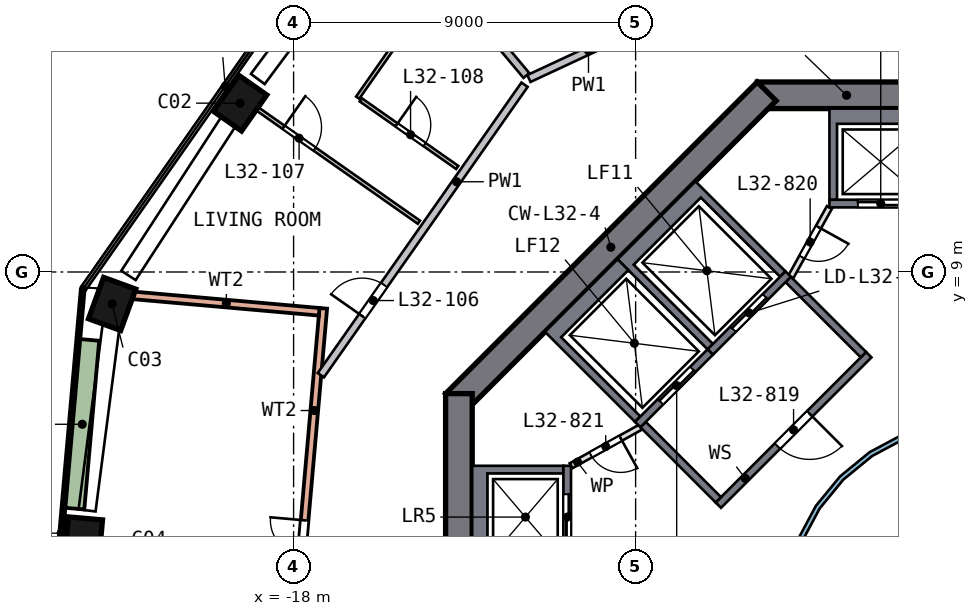
"""IFC4 building model, lengths in metres.
Left out: names, types, materials, properties, quantities, classifications, styles, units other than length and angle.
Written with IfcOpenShell. Run it as: python <this file> out.ifc"""

import sys

from ifc_helpers import new_model, si_unit, direction, frame, frame_2d, origin, origin_2d, place, context, subcontext, project, spatial, polyline, rectangle, outline, extrude, element, fill, save


model = new_model("IFC4")
c1 = context("Model", 3, precision=1e-05, world=origin(), true_north=direction((0.0, 1.0)))
c2 = subcontext(c1, "Body", "Model", "MODEL_VIEW")
j1 = project(units=[si_unit("LENGTHUNIT", "METRE"), si_unit("PLANEANGLEUNIT", "RADIAN")], contexts=[c1])
p1 = place(None, origin())
s1 = spatial("IfcSite", under=j1, at=p1, CompositionType="ELEMENT")
p2 = place(p1, origin())
s2 = spatial("IfcBuilding", under=s1, at=p2, CompositionType="ELEMENT")
p3 = place(p2, frame((0.0, 0.0, 136.5)))
s3 = spatial("IfcBuildingStorey", under=s2, at=p3, CompositionType="ELEMENT", Elevation=136.5)
p4 = place(p3, frame((-19.329, 13.555, 0.0), z_axis=(-0.063730151, -0.092477164, 0.993673207), x_axis=(-0.57078057, -0.813386058, -0.112306105)))
e1 = element("IfcColumn", 1, at=p4, inside=s3, PredefinedType="COLUMN", context=c2, shape_type="SweptSolid", body=[
    extrude(rectangle(XDim=1.15, YDim=0.9, at=origin_2d()), origin(), (0.0, 0.0, 1.0), 3.21),
])
p5 = place(p3, frame((-22.728, 8.29, 0.0), z_axis=(-0.038545284, -0.108413363, 0.993358346), x_axis=(0.340705914, 0.933103009, 0.115057614)))
e2 = element("IfcColumn", 2, at=p5, inside=s3, PredefinedType="COLUMN", context=c2, shape_type="SweptSolid", body=[
    extrude(rectangle(XDim=1.15, YDim=0.9, at=origin_2d()), origin(), (0.0, 0.0, 1.0), 3.211),
])
p6 = place(p3, frame((-23.517, 2.074, 0.0), z_axis=(-0.008897896, -0.111946178, 0.993674434), x_axis=(-0.087134884, -0.989847104, -0.112295249)))
e3 = element("IfcColumn", 3, at=p6, inside=s3, PredefinedType="COLUMN", context=c2, shape_type="SweptSolid", body=[
    extrude(rectangle(XDim=1.15, YDim=0.9, at=origin_2d()), origin(), (0.0, 0.0, 1.0), 3.21),
])
p7 = place(p3, frame((5.799, 13.65, 0.0), z_axis=(0.0, 0.0, 1.0), x_axis=(-1.0, 0.0, 0.0)))
e4 = element("IfcWall", 4, at=p7, inside=s3, PredefinedType="SHEAR", context=c2, shape_type="SweptSolid", body=[
    extrude(rectangle(XDim=11.598, YDim=0.7, at=frame_2d((5.799, 0.0))), origin(), (0.0, 0.0, 1.0), 3.5),
])
p8 = place(p7, frame((4.899, 0.0, 0.0)))
e5 = element("IfcOpeningElement", 5, at=p8, cuts=e4, PredefinedType="OPENING", context=c2, shape_type="SweptSolid", body=[
    extrude(rectangle(XDim=1.8, YDim=2.1, at=frame_2d((0.9, 1.05))), frame((0.0, 0.36, 0.0), z_axis=(0.0, -1.0, 0.0), x_axis=(1.0, 0.0, 0.0)), (0.0, 0.0, 1.0), 0.72),
])
p9 = place(p3, frame((-5.552, 13.752, 0.0), z_axis=(0.0, 0.0, 1.0), x_axis=(-0.707106781, -0.707106781, 0.0)))
e6 = element("IfcWall", 6, at=p9, inside=s3, PredefinedType="SHEAR", context=c2, shape_type="SweptSolid", body=[
    extrude(rectangle(XDim=11.598, YDim=0.7, at=frame_2d((5.799, 0.0))), origin(), (0.0, 0.0, 1.0), 3.5),
])
p10 = place(p3, frame((-13.65, 5.799, 0.0), z_axis=(0.0, 0.0, 1.0), x_axis=(0.0, -1.0, 0.0)))
e7 = element("IfcWall", 7, at=p10, inside=s3, PredefinedType="SHEAR", context=c2, shape_type="SweptSolid", body=[
    extrude(rectangle(XDim=11.598, YDim=0.7, at=frame_2d((5.799, 0.0))), origin(), (0.0, 0.0, 1.0), 3.5),
])
p11 = place(p10, frame((4.899, 0.0, 0.0)))
e8 = element("IfcOpeningElement", 8, at=p11, cuts=e7, PredefinedType="OPENING", context=c2, shape_type="SweptSolid", body=[
    extrude(rectangle(XDim=1.8, YDim=2.1, at=frame_2d((0.9, 1.05))), frame((0.0, 0.36, 0.0), z_axis=(0.0, -1.0, 0.0), x_axis=(1.0, 0.0, 0.0)), (0.0, 0.0, 1.0), 0.72),
])
p12 = place(p3, frame((-18.36, -4.906, 0.0), z_axis=(0.0, 0.0, 1.0), x_axis=(0.087853252, 0.996133428, 0.0)))
e9 = element("IfcWall", 9, at=p12, inside=s3, PredefinedType="SOLIDWALL", context=c2, shape_type="SweptSolid", body=[
    extrude(rectangle(XDim=13.0, YDim=0.2, at=frame_2d((6.5, 0.0))), origin(), (0.0, 0.0, 1.0), 3.19),
])
p13 = place(p12, frame((5.6, 0.0, 0.0)))
e10 = element("IfcOpeningElement", 10, at=p13, cuts=e9, PredefinedType="OPENING", context=c2, shape_type="SweptSolid", body=[
    extrude(rectangle(XDim=1.8, YDim=2.4, at=frame_2d((0.9, 1.2))), frame((0.0, 0.11, 0.0), z_axis=(0.0, -1.0, 0.0), x_axis=(1.0, 0.0, 0.0)), (0.0, 0.0, 1.0), 0.22),
])
p14 = place(p3, frame((-22.212, 8.384, 0.0), z_axis=(0.0, 0.0, 1.0), x_axis=(0.996132413, -0.087864753, 0.0)))
e11 = element("IfcWall", 11, at=p14, inside=s3, PredefinedType="SOLIDWALL", context=c2, shape_type="SweptSolid", body=[
    extrude(rectangle(XDim=4.904, YDim=0.2, at=frame_2d((2.452, 0.0))), origin(), (0.0, 0.0, 1.0), 3.19),
])
p15 = place(p3, frame((-23.551, 8.522, 0.0), z_axis=(0.0, 0.0, 1.0), x_axis=(-0.087843868, -0.996134255, 0.0)))
e12 = element("IfcWall", 12, at=p15, inside=s3, PredefinedType="SOLIDWALL", context=c2, shape_type="SweptSolid", body=[
    extrude(rectangle(XDim=12.84, YDim=0.1, at=frame_2d((6.42, 0.0))), origin(), (0.0, 0.0, 1.0), 0.7),
])
p16 = place(p3, frame((-23.365, 7.213, 0.0), z_axis=(0.0, 0.0, 1.0), x_axis=(-0.087858642, -0.996132953, 0.0)))
e13 = element("IfcWall", 13, at=p16, inside=s3, PredefinedType="SOLIDWALL", context=c2, shape_type="SweptSolid", body=[
    extrude(rectangle(XDim=4.457, YDim=0.5, at=frame_2d((2.229, 0.0))), origin(), (0.0, 0.0, 1.0), 0.7),
])
p17 = place(p3, origin())
e14 = element("IfcWall", 14, at=p17, inside=s3, PredefinedType="SOLIDWALL", context=c2, shape_type="SweptSolid", body=[
    extrude(outline(polyline([(-3.9, 10.9), (-3.9, 13.3), (-1.2, 13.3), (-1.2, 10.9), (-1.4, 10.9), (-1.4, 12.9), (-3.7, 12.9), (-3.7, 10.9), (-3.9, 10.9)])), origin(), (0.0, 0.0, 1.0), 3.19),
])
p18 = place(p3, frame((-1.2, 10.8, 0.0), z_axis=(0.0, 0.0, 1.0), x_axis=(-1.0, 0.0, 0.0)))
e15 = element("IfcWall", 15, at=p18, inside=s3, PredefinedType="SOLIDWALL", context=c2, shape_type="SweptSolid", body=[
    extrude(rectangle(XDim=2.7, YDim=0.2, at=frame_2d((1.35, 0.0))), origin(), (0.0, 0.0, 1.0), 3.19),
])
p19 = place(p18, frame((0.75, 0.0, 0.0)))
e16 = element("IfcOpeningElement", 16, at=p19, cuts=e15, PredefinedType="OPENING", context=c2, shape_type="SweptSolid", body=[
    extrude(rectangle(XDim=1.2, YDim=2.1, at=frame_2d((0.6, 1.05))), frame((0.0, 0.11, 0.0), z_axis=(0.0, -1.0, 0.0), x_axis=(1.0, 0.0, 0.0)), (0.0, 0.0, 1.0), 0.22),
])
p20 = place(p3, origin())
e17 = element("IfcWall", 17, at=p20, inside=s3, PredefinedType="SOLIDWALL", context=c2, shape_type="SweptSolid", body=[
    extrude(outline(polyline([(-13.3, 3.9), (-10.9, 3.9), (-10.9, 3.7), (-12.9, 3.7), (-12.9, 1.4), (-10.9, 1.4), (-10.9, 1.2), (-13.3, 1.2), (-13.3, 3.9)])), origin(), (0.0, 0.0, 1.0), 3.19),
])
p21 = place(p3, frame((-10.8, 1.2, 0.0), z_axis=(0.0, 0.0, 1.0), x_axis=(0.0, 1.0, 0.0)))
e18 = element("IfcWall", 18, at=p21, inside=s3, PredefinedType="SOLIDWALL", context=c2, shape_type="SweptSolid", body=[
    extrude(rectangle(XDim=2.7, YDim=0.2, at=frame_2d((1.35, 0.0))), origin(), (0.0, 0.0, 1.0), 3.19),
])
p22 = place(p21, frame((0.75, 0.0, 0.0)))
e19 = element("IfcOpeningElement", 19, at=p22, cuts=e18, PredefinedType="OPENING", context=c2, shape_type="SweptSolid", body=[
    extrude(rectangle(XDim=1.2, YDim=2.1, at=frame_2d((0.6, 1.05))), frame((0.0, 0.11, 0.0), z_axis=(0.0, -1.0, 0.0), x_axis=(1.0, 0.0, 0.0)), (0.0, 0.0, 1.0), 0.22),
])
p23 = place(p3, origin())
e20 = element("IfcWall", 20, at=p23, inside=s3, PredefinedType="SOLIDWALL", context=c2, shape_type="SweptSolid", body=[
    extrude(outline(polyline([(-9.475, 9.334), (-7.425, 11.385), (-5.056, 9.016), (-5.197, 8.874), (-7.283, 10.96), (-9.051, 9.192), (-6.965, 7.106), (-7.106, 6.965), (-9.475, 9.334)])), origin(), (0.0, 0.0, 1.0), 3.19),
])
p24 = place(p3, frame((-4.985, 8.945, 0.0), z_axis=(0.0, 0.0, 1.0), x_axis=(-0.707106781, -0.707106781, 0.0)))
e21 = element("IfcWall", 21, at=p24, inside=s3, PredefinedType="SOLIDWALL", context=c2, shape_type="SweptSolid", body=[
    extrude(rectangle(XDim=2.9, YDim=0.2, at=frame_2d((1.45, 0.0))), origin(), (0.0, 0.0, 1.0), 3.19),
])
p25 = place(p24, frame((0.85, 0.0, 0.0)))
e22 = element("IfcOpeningElement", 22, at=p25, cuts=e21, PredefinedType="OPENING", context=c2, shape_type="SweptSolid", body=[
    extrude(rectangle(XDim=1.2, YDim=2.1, at=frame_2d((0.6, 1.05))), frame((0.0, 0.11, 0.0), z_axis=(0.0, -1.0, 0.0), x_axis=(1.0, 0.0, 0.0)), (0.0, 0.0, 1.0), 0.22),
])
p26 = place(p3, origin())
e23 = element("IfcWall", 23, at=p26, inside=s3, PredefinedType="SOLIDWALL", context=c2, shape_type="SweptSolid", body=[
    extrude(outline(polyline([(-11.385, 7.425), (-9.475, 9.334), (-9.192, 9.051), (-10.96, 7.283), (-8.874, 5.197), (-9.016, 5.056), (-11.385, 7.425)])), origin(), (0.0, 0.0, 1.0), 3.19),
])
p27 = place(p3, frame((-7.036, 6.894, 0.0), z_axis=(0.0, 0.0, 1.0), x_axis=(-0.707106781, -0.707106781, 0.0)))
e24 = element("IfcWall", 24, at=p27, inside=s3, PredefinedType="SOLIDWALL", context=c2, shape_type="SweptSolid", body=[
    extrude(rectangle(XDim=2.7, YDim=0.2, at=frame_2d((1.35, 0.0))), origin(), (0.0, 0.0, 1.0), 3.19),
])
p28 = place(p27, frame((0.65, 0.0, 0.0)))
e25 = element("IfcOpeningElement", 25, at=p28, cuts=e24, PredefinedType="OPENING", context=c2, shape_type="SweptSolid", body=[
    extrude(rectangle(XDim=1.2, YDim=2.1, at=frame_2d((0.6, 1.05))), frame((0.0, 0.11, 0.0), z_axis=(0.0, -1.0, 0.0), x_axis=(1.0, 0.0, 0.0)), (0.0, 0.0, 1.0), 0.22),
])
p29 = place(p3, frame((-2.864, 6.823, 0.0), z_axis=(0.0, 0.0, 1.0), x_axis=(-0.707106781, -0.707106781, 0.0)))
e26 = element("IfcWall", 26, at=p29, inside=s3, PredefinedType="SOLIDWALL", context=c2, shape_type="SweptSolid", body=[
    extrude(rectangle(XDim=5.6, YDim=0.2, at=frame_2d((2.8, 0.0))), origin(), (0.0, 0.0, 1.0), 3.19),
])
p30 = place(p29, frame((2.2, 0.0, 0.0)))
e27 = element("IfcOpeningElement", 27, at=p30, cuts=e26, PredefinedType="OPENING", context=c2, shape_type="SweptSolid", body=[
    extrude(rectangle(XDim=1.2, YDim=2.1, at=frame_2d((0.6, 1.05))), frame((0.0, 0.11, 0.0), z_axis=(0.0, -1.0, 0.0), x_axis=(1.0, 0.0, 0.0)), (0.0, 0.0, 1.0), 0.22),
])
for number, where, z_axis, x_axis in (
    (28, (-3.005, 6.823, 0.0), (0.0, 0.0, 1.0), (-0.707, 0.707, 0.0)),
    (29, (-6.823, 3.005, 0.0), (0.0, 0.0, 1.0), (-0.707, 0.707, 0.0)),
):
    element("IfcWall", number, at=place(p3, frame(where, z_axis=z_axis, x_axis=x_axis)), inside=s3, PredefinedType="SOLIDWALL", context=c2, shape_type="SweptSolid", body=[
        extrude(rectangle(XDim=2.8, YDim=0.2, at=frame_2d((1.4, 0.0))), origin(), (0.0, 0.0, 1.0), 3.19),
    ])
p31 = place(p3, frame((-3.9, 10.7, 0.0), z_axis=(0.0, 0.0, 1.0), x_axis=(-0.485692555, -0.874129705, 0.0)))
e30 = element("IfcWall", 30, at=p31, inside=s3, PredefinedType="PARTITIONING", context=c2, shape_type="SweptSolid", body=[
    extrude(rectangle(XDim=2.089, YDim=0.15, at=frame_2d((1.044, 0.0))), origin(), (0.0, 0.0, 1.0), 3.19),
])
p32 = place(p31, frame((0.594, 0.0, 0.0)))
e31 = element("IfcOpeningElement", 31, at=p32, cuts=e30, PredefinedType="OPENING", context=c2, shape_type="SweptSolid", body=[
    extrude(rectangle(XDim=0.9, YDim=2.1, at=frame_2d((0.45, 1.05))), frame((0.0, 0.085, 0.0), z_axis=(0.0, -1.0, 0.0), x_axis=(1.0, 0.0, 0.0)), (0.0, 0.0, 1.0), 0.17),
])
p33 = place(p3, frame((-8.874, 4.914, 0.0), z_axis=(0.0, 0.0, 1.0), x_axis=(-0.874129705, -0.485692555, 0.0)))
e32 = element("IfcWall", 32, at=p33, inside=s3, PredefinedType="PARTITIONING", context=c2, shape_type="SweptSolid", body=[
    extrude(rectangle(XDim=2.089, YDim=0.15, at=frame_2d((1.044, 0.0))), origin(), (0.0, 0.0, 1.0), 3.19),
])
p34 = place(p33, frame((0.594, 0.0, 0.0)))
e33 = element("IfcOpeningElement", 33, at=p34, cuts=e32, PredefinedType="OPENING", context=c2, shape_type="SweptSolid", body=[
    extrude(rectangle(XDim=0.9, YDim=2.1, at=frame_2d((0.45, 1.05))), frame((0.0, 0.085, 0.0), z_axis=(0.0, -1.0, 0.0), x_axis=(1.0, 0.0, 0.0)), (0.0, 0.0, 1.0), 0.17),
])
p35 = place(p3, origin())
e34 = element("IfcWall", 34, at=p35, inside=s3, PredefinedType="SOLIDWALL", context=c2, shape_type="SweptSolid", body=[
    extrude(outline(polyline([(5.021, -0.999), (4.73, -1.959), (4.257, -2.844), (3.62, -3.62), (2.844, -4.257), (1.959, -4.73), (0.999, -5.021), (0.0, -5.12), (-0.999, -5.021), (-1.959, -4.73), (-2.844, -4.257), (-3.62, -3.62), (-4.257, -2.844), (-4.73, -1.959), (-5.021, -0.999), (-5.12, 0.0), (-5.021, 0.999), (-4.73, 1.959), (-4.257, 2.844), (-3.62, 3.62), (-2.844, 4.257), (-1.959, 4.73), (-0.999, 5.021), (0.0, 5.12), (0.999, 5.021), (1.959, 4.73), (2.844, 4.257), (3.62, 3.62), (4.257, 2.844), (4.73, 1.959), (5.021, 0.999), (5.12, 0.0), (5.021, -0.999)]), holes=[polyline([(4.904, 0.976), (4.619, 1.913), (4.157, 2.778), (3.535, 3.535), (2.778, 4.157), (1.913, 4.619), (0.976, 4.904), (0.0, 5.0), (-0.976, 4.904), (-1.913, 4.619), (-2.778, 4.157), (-3.535, 3.535), (-4.157, 2.778), (-4.619, 1.913), (-4.904, 0.976), (-5.0, 0.0), (-4.904, -0.976), (-4.619, -1.913), (-4.157, -2.778), (-3.535, -3.535), (-2.778, -4.157), (-1.913, -4.619), (-0.976, -4.904), (0.0, -5.0), (0.976, -4.904), (1.913, -4.619), (2.778, -4.157), (3.535, -3.535), (4.157, -2.778), (4.619, -1.913), (4.904, -0.976), (5.0, 0.0), (4.904, 0.976)])]), origin(), (0.0, 0.0, 1.0), 3.19),
])
p36 = place(p3, frame((-17.283, 6.284, 0.0), z_axis=(0.0, 0.0, 1.0), x_axis=(0.574151841, 0.81874884, 0.0)))
e35 = element("IfcWall", 35, at=p36, inside=s3, PredefinedType="SOLIDWALL", context=c2, shape_type="SweptSolid", body=[
    extrude(rectangle(XDim=9.336, YDim=0.2, at=frame_2d((4.668, 0.0))), origin(), (0.0, 0.0, 1.0), 3.19),
])
p37 = place(p36, frame((1.9, 0.0, 0.0)))
e36 = element("IfcOpeningElement", 36, at=p37, cuts=e35, PredefinedType="OPENING", context=c2, shape_type="SweptSolid", body=[
    extrude(rectangle(XDim=1.0, YDim=2.1, at=frame_2d((0.5, 1.05))), frame((0.0, 0.11, 0.0), z_axis=(0.0, -1.0, 0.0), x_axis=(1.0, 0.0, 0.0)), (0.0, 0.0, 1.0), 0.22),
])
p38 = place(p3, frame((-8.672, 15.551, 0.0), z_axis=(0.0, 0.0, 1.0), x_axis=(-0.906586718, -0.422019576, 0.0)))
e37 = element("IfcWall", 37, at=p38, inside=s3, PredefinedType="SOLIDWALL", context=c2, shape_type="SweptSolid", body=[
    extrude(rectangle(XDim=3.458, YDim=0.2, at=frame_2d((1.729, 0.0))), origin(), (0.0, 0.0, 1.0), 3.19),
])
p39 = place(p3, frame((-11.874, 14.171, 0.0), z_axis=(0.0, 0.0, 1.0), x_axis=(-0.642233473, 0.766509078, 0.0)))
e38 = element("IfcWall", 38, at=p39, inside=s3, PredefinedType="SOLIDWALL", context=c2, shape_type="SweptSolid", body=[
    extrude(rectangle(XDim=3.418, YDim=0.2, at=frame_2d((1.709, 0.0))), origin(), (0.0, 0.0, 1.0), 3.19),
])
p40 = place(p3, frame((-19.739, 13.842, 0.0), z_axis=(0.0, 0.0, 1.0), x_axis=(0.818756071, -0.57414153, 0.0)))
e39 = element("IfcWall", 39, at=p40, inside=s3, PredefinedType="PARTITIONING", context=c2, shape_type="SweptSolid", body=[
    extrude(rectangle(XDim=6.15, YDim=0.1, at=frame_2d((3.075, 0.0))), origin(), (0.0, 0.0, 1.0), 3.19),
])
p41 = place(p40, frame((1.8, 0.0, 0.0)))
e40 = element("IfcOpeningElement", 40, at=p41, cuts=e39, PredefinedType="OPENING", context=c2, shape_type="SweptSolid", body=[
    extrude(rectangle(XDim=1.0, YDim=2.1, at=frame_2d((0.5, 1.05))), frame((0.0, 0.06, 0.0), z_axis=(0.0, -1.0, 0.0), x_axis=(1.0, 0.0, 0.0)), (0.0, 0.0, 1.0), 0.12),
])
p42 = place(p3, frame((-14.187, 16.62, 0.0), z_axis=(0.0, 0.0, 1.0), x_axis=(-0.574152218, -0.818748576, 0.0)))
e41 = element("IfcWall", 41, at=p42, inside=s3, PredefinedType="PARTITIONING", context=c2, shape_type="SweptSolid", body=[
    extrude(rectangle(XDim=3.704, YDim=0.1, at=frame_2d((1.852, 0.0))), origin(), (0.0, 0.0, 1.0), 3.19),
])
p43 = place(p3, frame((-16.232, 13.53, 0.0), z_axis=(0.0, 0.0, 1.0), x_axis=(0.818758042, -0.574138719, 0.0)))
e42 = element("IfcWall", 42, at=p43, inside=s3, PredefinedType="PARTITIONING", context=c2, shape_type="SweptSolid", body=[
    extrude(rectangle(XDim=3.1, YDim=0.1, at=frame_2d((1.55, 0.0))), origin(), (0.0, 0.0, 1.0), 3.19),
])
p44 = place(p43, frame((1.15, 0.0, 0.0)))
e43 = element("IfcOpeningElement", 43, at=p44, cuts=e42, PredefinedType="OPENING", context=c2, shape_type="SweptSolid", body=[
    extrude(rectangle(XDim=0.9, YDim=2.1, at=frame_2d((0.45, 1.05))), frame((0.0, 0.06, 0.0), z_axis=(0.0, -1.0, 0.0), x_axis=(1.0, 0.0, 0.0)), (0.0, 0.0, 1.0), 0.12),
])
p45 = place(p13, origin())
e44 = element("IfcDoor", 44, at=p45, inside=s3, OperationType="DOUBLE_DOOR_SINGLE_SWING", PredefinedType="DOOR", context=c2, shape_type="SweptSolid", body=[
    extrude(rectangle(XDim=1.8, YDim=2.4, at=frame_2d((0.9, 1.2))), frame((0.0, 0.025, 0.0), z_axis=(0.0, -1.0, 0.0), x_axis=(1.0, 0.0, 0.0)), (0.0, 0.0, 1.0), 0.05),
])
fill(e10, e44)
p46 = place(p19, origin())
e45 = element("IfcDoor", 45, at=p46, inside=s3, OperationType="DOUBLE_DOOR_SLIDING", PredefinedType="DOOR", context=c2, shape_type="SweptSolid", body=[
    extrude(rectangle(XDim=1.2, YDim=2.1, at=frame_2d((0.6, 1.05))), frame((0.0, 0.025, 0.0), z_axis=(0.0, -1.0, 0.0), x_axis=(1.0, 0.0, 0.0)), (0.0, 0.0, 1.0), 0.05),
])
fill(e16, e45)
p47 = place(p22, origin())
e46 = element("IfcDoor", 46, at=p47, inside=s3, OperationType="DOUBLE_DOOR_SLIDING", PredefinedType="DOOR", context=c2, shape_type="SweptSolid", body=[
    extrude(rectangle(XDim=1.2, YDim=2.1, at=frame_2d((0.6, 1.05))), frame((0.0, 0.025, 0.0), z_axis=(0.0, -1.0, 0.0), x_axis=(1.0, 0.0, 0.0)), (0.0, 0.0, 1.0), 0.05),
])
fill(e19, e46)
p48 = place(p25, origin())
e47 = element("IfcDoor", 47, at=p48, inside=s3, OperationType="DOUBLE_DOOR_SLIDING", PredefinedType="DOOR", context=c2, shape_type="SweptSolid", body=[
    extrude(rectangle(XDim=1.2, YDim=2.1, at=frame_2d((0.6, 1.05))), frame((0.0, 0.025, 0.0), z_axis=(0.0, -1.0, 0.0), x_axis=(1.0, 0.0, 0.0)), (0.0, 0.0, 1.0), 0.05),
])
fill(e22, e47)
p49 = place(p28, origin())
e48 = element("IfcDoor", 48, at=p49, inside=s3, OperationType="DOUBLE_DOOR_SLIDING", PredefinedType="DOOR", context=c2, shape_type="SweptSolid", body=[
    extrude(rectangle(XDim=1.2, YDim=2.1, at=frame_2d((0.6, 1.05))), frame((0.0, 0.025, 0.0), z_axis=(0.0, -1.0, 0.0), x_axis=(1.0, 0.0, 0.0)), (0.0, 0.0, 1.0), 0.05),
])
fill(e25, e48)
p50 = place(p30, origin())
e49 = element("IfcDoor", 49, at=p50, inside=s3, OperationType="SINGLE_SWING_LEFT", PredefinedType="DOOR", context=c2, shape_type="SweptSolid", body=[
    extrude(rectangle(XDim=1.2, YDim=2.1, at=frame_2d((0.6, 1.05))), frame((0.0, 0.025, 0.0), z_axis=(0.0, -1.0, 0.0), x_axis=(1.0, 0.0, 0.0)), (0.0, 0.0, 1.0), 0.05),
])
fill(e27, e49)
p51 = place(p32, origin())
e50 = element("IfcDoor", 50, at=p51, inside=s3, OperationType="SINGLE_SWING_LEFT", PredefinedType="DOOR", context=c2, shape_type="SweptSolid", body=[
    extrude(rectangle(XDim=0.9, YDim=2.1, at=frame_2d((0.45, 1.05))), frame((0.0, 0.025, 0.0), z_axis=(0.0, -1.0, 0.0), x_axis=(1.0, 0.0, 0.0)), (0.0, 0.0, 1.0), 0.05),
])
fill(e31, e50)
p52 = place(p34, origin())
e51 = element("IfcDoor", 51, at=p52, inside=s3, OperationType="SINGLE_SWING_LEFT", PredefinedType="DOOR", context=c2, shape_type="SweptSolid", body=[
    extrude(rectangle(XDim=0.9, YDim=2.1, at=frame_2d((0.45, 1.05))), frame((0.0, 0.025, 0.0), z_axis=(0.0, -1.0, 0.0), x_axis=(1.0, 0.0, 0.0)), (0.0, 0.0, 1.0), 0.05),
])
fill(e33, e51)
p53 = place(p37, origin())
e52 = element("IfcDoor", 52, at=p53, inside=s3, OperationType="SINGLE_SWING_LEFT", PredefinedType="DOOR", context=c2, shape_type="SweptSolid", body=[
    extrude(rectangle(XDim=1.0, YDim=2.1, at=frame_2d((0.5, 1.05))), frame((0.0, 0.025, 0.0), z_axis=(0.0, -1.0, 0.0), x_axis=(1.0, 0.0, 0.0)), (0.0, 0.0, 1.0), 0.05),
])
fill(e36, e52)
p54 = place(p41, origin())
e53 = element("IfcDoor", 53, at=p54, inside=s3, OperationType="SINGLE_SWING_LEFT", PredefinedType="DOOR", context=c2, shape_type="SweptSolid", body=[
    extrude(rectangle(XDim=1.0, YDim=2.1, at=frame_2d((0.5, 1.05))), frame((0.0, 0.025, 0.0), z_axis=(0.0, -1.0, 0.0), x_axis=(1.0, 0.0, 0.0)), (0.0, 0.0, 1.0), 0.05),
])
fill(e40, e53)
p55 = place(p44, origin())
e54 = element("IfcDoor", 54, at=p55, inside=s3, OperationType="SINGLE_SWING_LEFT", PredefinedType="DOOR", context=c2, shape_type="SweptSolid", body=[
    extrude(rectangle(XDim=0.9, YDim=2.1, at=frame_2d((0.45, 1.05))), frame((0.0, 0.025, 0.0), z_axis=(0.0, -1.0, 0.0), x_axis=(1.0, 0.0, 0.0)), (0.0, 0.0, 1.0), 0.05),
])
fill(e43, e54)
save(model, sys.argv[1])
